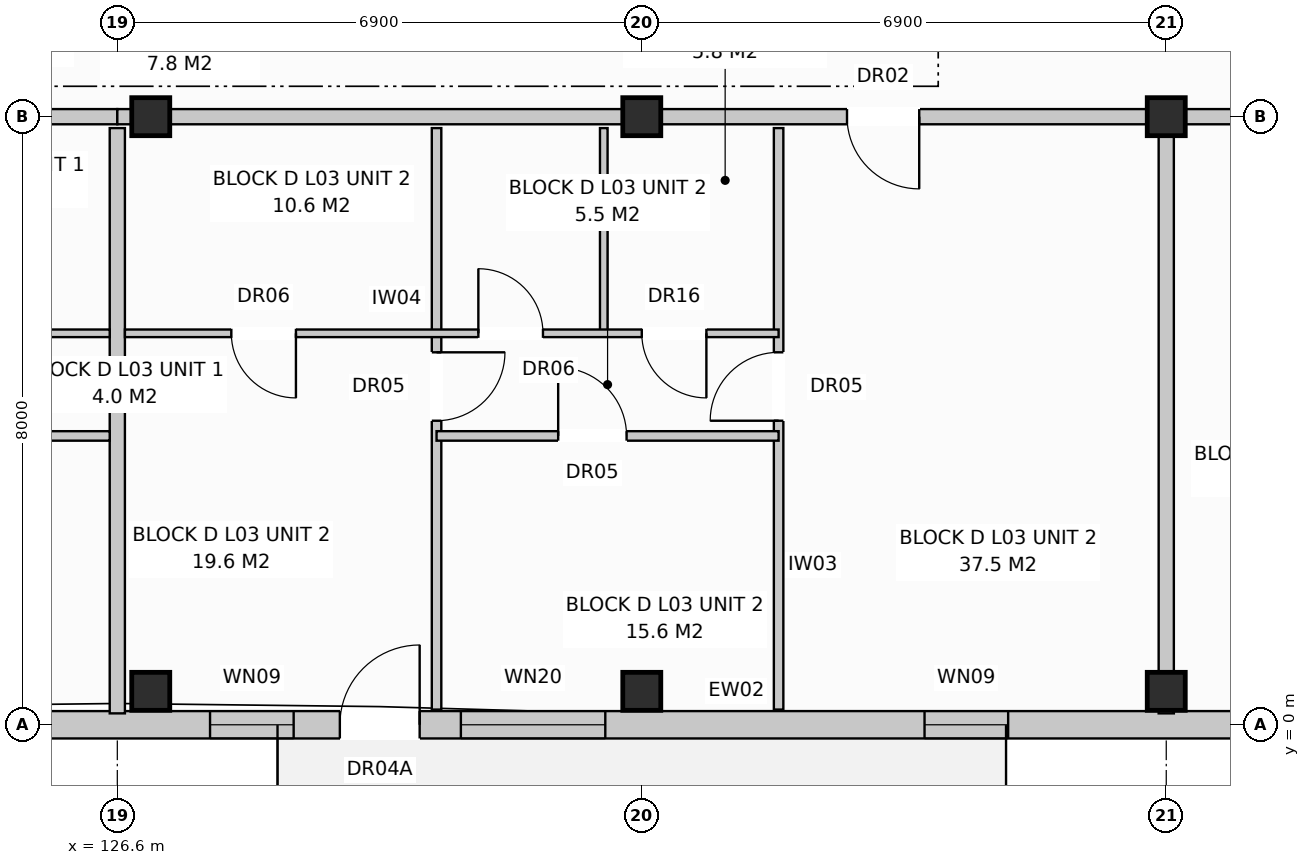
"""IFC4 building model, lengths in metres.
Left out: names, types, materials, properties, quantities, classifications, styles, units other than length and angle.
Written with IfcOpenShell. Run it as: python <this file> out.ifc"""

import sys

from ifc_helpers import new_model, si_unit, direction, frame, frame_2d, origin, origin_with_axes, origin_2d, place, context, subcontext, project, spatial, rectangle, extrude, element, fill, save


model = new_model("IFC4")
c1 = context("Model", 3, precision=1e-05, world=origin(), true_north=direction((0.0, 1.0)))
c2 = subcontext(c1, "Body", "Model", "MODEL_VIEW")
j1 = project(units=[si_unit("LENGTHUNIT", "METRE"), si_unit("PLANEANGLEUNIT", "RADIAN")], contexts=[c1])
p1 = place(None, origin())
s1 = spatial("IfcSite", under=j1, at=p1, CompositionType="ELEMENT")
p2 = place(p1, origin())
s2 = spatial("IfcBuilding", under=s1, at=p2, CompositionType="ELEMENT")
p3 = place(p2, frame((0.0, 0.0, 11.2)))
s3 = spatial("IfcBuildingStorey", under=s2, at=p3, CompositionType="ELEMENT", Elevation=11.2)
for number, where, z_axis, x_axis in (
    (1, (127.04, 0.44, 0.0), (0.0, 0.0, 1.0), (1.0, 0.0, 0.0)),
    (2, (127.04, 8.0, 0.0), (0.0, 0.0, 1.0), (1.0, 0.0, 0.0)),
    (3, (133.5, 0.44, 0.0), (0.0, 0.0, 1.0), (1.0, 0.0, 0.0)),
    (4, (133.5, 8.0, 0.0), (0.0, 0.0, 1.0), (1.0, 0.0, 0.0)),
    (5, (140.4, 0.44, 0.0), (0.0, 0.0, 1.0), (1.0, 0.0, 0.0)),
    (6, (140.4, 8.0, 0.0), (0.0, 0.0, 1.0), (1.0, 0.0, 0.0)),
):
    element("IfcColumn", number, at=place(p3, frame(where, z_axis=z_axis, x_axis=x_axis)), inside=s3, PredefinedType="COLUMN", context=c2, shape_type="SweptSolid", body=[
        extrude(rectangle(XDim=0.5, YDim=0.5, at=origin_2d()), origin(), (0.0, 0.0, 1.0), 3.2),
    ])
p4 = place(p3, frame((112.97, 0.0, 0.0), z_axis=(0.0, 0.0, 1.0), x_axis=(1.0, 0.0, 0.0)))
e7 = element("IfcWall", 7, at=p4, inside=s3, PredefinedType="STANDARD", context=c2, shape_type="SweptSolid", body=[
    extrude(rectangle(XDim=54.86, YDim=0.36, at=frame_2d((27.43, 0.0))), origin(), (0.0, 0.0, 1.0), 2.94),
])
p5 = place(p4, frame((3.764, 0.0, 0.0)))
e8 = element("IfcOpeningElement", 8, at=p5, cuts=e7, PredefinedType="OPENING", context=c2, shape_type="SweptSolid", body=[
    extrude(rectangle(XDim=1.05, YDim=2.12, at=frame_2d((0.525, 1.06))), frame((0.0, 0.192, 0.0), z_axis=(0.0, -1.0, 0.0), x_axis=(1.0, 0.0, 0.0)), (0.0, 0.0, 1.0), 0.384),
])
p6 = place(p4, frame((16.558, 0.0, 0.0)))
e9 = element("IfcOpeningElement", 9, at=p6, cuts=e7, PredefinedType="OPENING", context=c2, shape_type="SweptSolid", body=[
    extrude(rectangle(XDim=1.05, YDim=2.12, at=frame_2d((0.525, 1.06))), frame((0.0, 0.192, 0.0), z_axis=(0.0, -1.0, 0.0), x_axis=(1.0, 0.0, 0.0)), (0.0, 0.0, 1.0), 0.384),
])
p7 = place(p4, frame((30.058, 0.0, 0.0)))
e10 = element("IfcOpeningElement", 10, at=p7, cuts=e7, PredefinedType="OPENING", context=c2, shape_type="SweptSolid", body=[
    extrude(rectangle(XDim=1.05, YDim=2.12, at=frame_2d((0.525, 1.06))), frame((0.0, 0.192, 0.0), z_axis=(0.0, -1.0, 0.0), x_axis=(1.0, 0.0, 0.0)), (0.0, 0.0, 1.0), 0.384),
])
p8 = place(p4, frame((45.158, 0.0, 0.0)))
e11 = element("IfcOpeningElement", 11, at=p8, cuts=e7, PredefinedType="OPENING", context=c2, shape_type="SweptSolid", body=[
    extrude(rectangle(XDim=1.05, YDim=2.12, at=frame_2d((0.525, 1.06))), frame((0.0, 0.192, 0.0), z_axis=(0.0, -1.0, 0.0), x_axis=(1.0, 0.0, 0.0)), (0.0, 0.0, 1.0), 0.384),
])
p9 = place(p4, frame((1.6, 0.0, 0.8)))
e12 = element("IfcOpeningElement", 12, at=p9, cuts=e7, PredefinedType="OPENING", context=c2, shape_type="SweptSolid", body=[
    extrude(rectangle(XDim=1.8, YDim=1.7, at=frame_2d((0.9, 0.85))), frame((0.0, 0.192, 0.0), z_axis=(0.0, -1.0, 0.0), x_axis=(1.0, 0.0, 0.0)), (0.0, 0.0, 1.0), 0.384),
])
p10 = place(p4, frame((7.65, 0.0, 0.72)))
e13 = element("IfcOpeningElement", 13, at=p10, cuts=e7, PredefinedType="OPENING", context=c2, shape_type="SweptSolid", body=[
    extrude(rectangle(XDim=1.1, YDim=1.5, at=frame_2d((0.55, 0.75))), frame((0.0, 0.192, 0.0), z_axis=(0.0, -1.0, 0.0), x_axis=(1.0, 0.0, 0.0)), (0.0, 0.0, 1.0), 0.384),
])
p11 = place(p4, frame((10.425, 0.0, 0.8)))
e14 = element("IfcOpeningElement", 14, at=p11, cuts=e7, PredefinedType="OPENING", context=c2, shape_type="SweptSolid", body=[
    extrude(rectangle(XDim=1.95, YDim=1.65, at=frame_2d((0.975, 0.825))), frame((0.0, 0.192, 0.0), z_axis=(0.0, -1.0, 0.0), x_axis=(1.0, 0.0, 0.0)), (0.0, 0.0, 1.0), 0.384),
])
p12 = place(p4, frame((14.85, 0.0, 0.72)))
e15 = element("IfcOpeningElement", 15, at=p12, cuts=e7, PredefinedType="OPENING", context=c2, shape_type="SweptSolid", body=[
    extrude(rectangle(XDim=1.1, YDim=1.5, at=frame_2d((0.55, 0.75))), frame((0.0, 0.192, 0.0), z_axis=(0.0, -1.0, 0.0), x_axis=(1.0, 0.0, 0.0)), (0.0, 0.0, 1.0), 0.384),
])
p13 = place(p4, frame((18.15, 0.0, 0.72)))
e16 = element("IfcOpeningElement", 16, at=p13, cuts=e7, PredefinedType="OPENING", context=c2, shape_type="SweptSolid", body=[
    extrude(rectangle(XDim=1.9, YDim=1.85, at=frame_2d((0.95, 0.925))), frame((0.0, 0.192, 0.0), z_axis=(0.0, -1.0, 0.0), x_axis=(1.0, 0.0, 0.0)), (0.0, 0.0, 1.0), 0.384),
])
p14 = place(p4, frame((24.25, 0.0, 0.72)))
e17 = element("IfcOpeningElement", 17, at=p14, cuts=e7, PredefinedType="OPENING", context=c2, shape_type="SweptSolid", body=[
    extrude(rectangle(XDim=1.1, YDim=1.5, at=frame_2d((0.55, 0.75))), frame((0.0, 0.192, 0.0), z_axis=(0.0, -1.0, 0.0), x_axis=(1.0, 0.0, 0.0)), (0.0, 0.0, 1.0), 0.384),
])
p15 = place(p4, frame((28.35, 0.0, 0.72)))
e18 = element("IfcOpeningElement", 18, at=p15, cuts=e7, PredefinedType="OPENING", context=c2, shape_type="SweptSolid", body=[
    extrude(rectangle(XDim=1.1, YDim=1.5, at=frame_2d((0.55, 0.75))), frame((0.0, 0.192, 0.0), z_axis=(0.0, -1.0, 0.0), x_axis=(1.0, 0.0, 0.0)), (0.0, 0.0, 1.0), 0.384),
])
p16 = place(p4, frame((31.85, 0.0, 0.72)))
e19 = element("IfcOpeningElement", 19, at=p16, cuts=e7, PredefinedType="OPENING", context=c2, shape_type="SweptSolid", body=[
    extrude(rectangle(XDim=1.9, YDim=1.85, at=frame_2d((0.95, 0.925))), frame((0.0, 0.192, 0.0), z_axis=(0.0, -1.0, 0.0), x_axis=(1.0, 0.0, 0.0)), (0.0, 0.0, 1.0), 0.384),
])
p17 = place(p4, frame((35.325, 0.0, 0.8)))
e20 = element("IfcOpeningElement", 20, at=p17, cuts=e7, PredefinedType="OPENING", context=c2, shape_type="SweptSolid", body=[
    extrude(rectangle(XDim=1.95, YDim=1.65, at=frame_2d((0.975, 0.825))), frame((0.0, 0.192, 0.0), z_axis=(0.0, -1.0, 0.0), x_axis=(1.0, 0.0, 0.0)), (0.0, 0.0, 1.0), 0.384),
])
p18 = place(p4, frame((39.15, 0.0, 0.72)))
e21 = element("IfcOpeningElement", 21, at=p18, cuts=e7, PredefinedType="OPENING", context=c2, shape_type="SweptSolid", body=[
    extrude(rectangle(XDim=1.1, YDim=1.5, at=frame_2d((0.55, 0.75))), frame((0.0, 0.192, 0.0), z_axis=(0.0, -1.0, 0.0), x_axis=(1.0, 0.0, 0.0)), (0.0, 0.0, 1.0), 0.384),
])
p19 = place(p4, frame((42.95, 0.0, 0.8)))
e22 = element("IfcOpeningElement", 22, at=p19, cuts=e7, PredefinedType="OPENING", context=c2, shape_type="SweptSolid", body=[
    extrude(rectangle(XDim=1.9, YDim=1.85, at=frame_2d((0.95, 0.925))), frame((0.0, 0.192, 0.0), z_axis=(0.0, -1.0, 0.0), x_axis=(1.0, 0.0, 0.0)), (0.0, 0.0, 1.0), 0.384),
])
p20 = place(p4, frame((48.583, 0.0, 0.8)))
e23 = element("IfcOpeningElement", 23, at=p20, cuts=e7, PredefinedType="OPENING", context=c2, shape_type="SweptSolid", body=[
    extrude(rectangle(XDim=1.95, YDim=1.65, at=frame_2d((0.975, 0.825))), frame((0.0, 0.192, 0.0), z_axis=(0.0, -1.0, 0.0), x_axis=(1.0, 0.0, 0.0)), (0.0, 0.0, 1.0), 0.384),
])
p21 = place(p4, frame((52.25, 0.0, 0.72)))
e24 = element("IfcOpeningElement", 24, at=p21, cuts=e7, PredefinedType="OPENING", context=c2, shape_type="SweptSolid", body=[
    extrude(rectangle(XDim=1.1, YDim=1.5, at=frame_2d((0.55, 0.75))), frame((0.0, 0.192, 0.0), z_axis=(0.0, -1.0, 0.0), x_axis=(1.0, 0.0, 0.0)), (0.0, 0.0, 1.0), 0.384),
])
p22 = place(p3, frame((126.6, 7.85, 0.0), z_axis=(0.0, 0.0, 1.0), x_axis=(0.0, -1.0, 0.0)))
e25 = element("IfcWall", 25, at=p22, inside=s3, PredefinedType="PARTITIONING", context=c2, shape_type="SweptSolid", body=[
    extrude(rectangle(XDim=7.7, YDim=0.2, at=frame_2d((3.85, 0.0))), origin(), (0.0, 0.0, 1.0), 2.94),
])
p23 = place(p3, frame((112.8, 8.0, 0.0), z_axis=(0.0, 0.0, 1.0), x_axis=(1.0, 0.0, 0.0)))
e26 = element("IfcWall", 26, at=p23, inside=s3, PredefinedType="PARTITIONING", context=c2, shape_type="SweptSolid", body=[
    extrude(rectangle(XDim=13.8, YDim=0.2, at=frame_2d((6.9, 0.0))), origin(), (0.0, 0.0, 1.0), 2.38),
])
p24 = place(p23, frame((2.4, 0.0, 0.0)))
e27 = element("IfcOpeningElement", 27, at=p24, cuts=e26, PredefinedType="OPENING", context=c2, shape_type="SweptSolid", body=[
    extrude(rectangle(XDim=0.95, YDim=2.15, at=frame_2d((0.475, 1.075))), frame((0.0, 0.112, 0.0), z_axis=(0.0, -1.0, 0.0), x_axis=(1.0, 0.0, 0.0)), (0.0, 0.0, 1.0), 0.224),
])
p25 = place(p3, frame((118.0, 5.15, 0.0), z_axis=(0.0, 0.0, 1.0), x_axis=(1.0, 0.0, 0.0)))
e28 = element("IfcWall", 28, at=p25, inside=s3, PredefinedType="PARTITIONING", context=c2, shape_type="SweptSolid", body=[
    extrude(rectangle(XDim=8.5, YDim=0.1, at=frame_2d((4.25, 0.0))), origin(), (0.0, 0.0, 1.0), 2.94),
])
p26 = place(p25, frame((1.0, 0.0, 0.0)))
e29 = element("IfcOpeningElement", 29, at=p26, cuts=e28, PredefinedType="OPENING", context=c2, shape_type="SweptSolid", body=[
    extrude(rectangle(XDim=0.85, YDim=2.1, at=frame_2d((0.425, 1.05))), frame((0.0, 0.062, 0.0), z_axis=(0.0, -1.0, 0.0), x_axis=(1.0, 0.0, 0.0)), (0.0, 0.0, 1.0), 0.124),
])
p27 = place(p25, frame((3.4, 0.0, 0.0)))
e30 = element("IfcOpeningElement", 30, at=p27, cuts=e28, PredefinedType="OPENING", context=c2, shape_type="SweptSolid", body=[
    extrude(rectangle(XDim=0.85, YDim=2.05, at=frame_2d((0.425, 1.025))), frame((0.0, 0.062, 0.0), z_axis=(0.0, -1.0, 0.0), x_axis=(1.0, 0.0, 0.0)), (0.0, 0.0, 1.0), 0.124),
])
p28 = place(p25, frame((6.2, 0.0, 0.0)))
e31 = element("IfcOpeningElement", 31, at=p28, cuts=e28, PredefinedType="OPENING", context=c2, shape_type="SweptSolid", body=[
    extrude(rectangle(XDim=0.85, YDim=2.05, at=frame_2d((0.425, 1.025))), frame((0.0, 0.062, 0.0), z_axis=(0.0, -1.0, 0.0), x_axis=(1.0, 0.0, 0.0)), (0.0, 0.0, 1.0), 0.124),
])
p29 = place(p3, frame((118.0, 3.8, 0.0), z_axis=(0.0, 0.0, 1.0), x_axis=(1.0, 0.0, 0.0)))
e32 = element("IfcWall", 32, at=p29, inside=s3, PredefinedType="PARTITIONING", context=c2, shape_type="SweptSolid", body=[
    extrude(rectangle(XDim=8.5, YDim=0.125, at=frame_2d((4.25, 0.0))), origin(), (0.0, 0.0, 1.0), 2.94),
])
p30 = place(p29, frame((1.5, 0.0, 0.0)))
e33 = element("IfcOpeningElement", 33, at=p30, cuts=e32, PredefinedType="OPENING", context=c2, shape_type="SweptSolid", body=[
    extrude(rectangle(XDim=0.9, YDim=2.1, at=frame_2d((0.45, 1.05))), frame((0.0, 0.074, 0.0), z_axis=(0.0, -1.0, 0.0), x_axis=(1.0, 0.0, 0.0)), (0.0, 0.0, 1.0), 0.149),
])
p31 = place(p29, frame((5.6, 0.0, 0.0)))
e34 = element("IfcOpeningElement", 34, at=p31, cuts=e32, PredefinedType="OPENING", context=c2, shape_type="SweptSolid", body=[
    extrude(rectangle(XDim=0.9, YDim=2.1, at=frame_2d((0.45, 1.05))), frame((0.0, 0.074, 0.0), z_axis=(0.0, -1.0, 0.0), x_axis=(1.0, 0.0, 0.0)), (0.0, 0.0, 1.0), 0.149),
])
p32 = place(p3, frame((140.4, 7.85, 0.0), z_axis=(0.0, 0.0, 1.0), x_axis=(0.0, -1.0, 0.0)))
e35 = element("IfcWall", 35, at=p32, inside=s3, PredefinedType="PARTITIONING", context=c2, shape_type="SweptSolid", body=[
    extrude(rectangle(XDim=7.7, YDim=0.2, at=frame_2d((3.85, 0.0))), origin(), (0.0, 0.0, 1.0), 2.94),
])
p33 = place(p3, frame((126.6, 8.0, 0.0), z_axis=(0.0, 0.0, 1.0), x_axis=(1.0, 0.0, 0.0)))
e36 = element("IfcWall", 36, at=p33, inside=s3, PredefinedType="PARTITIONING", context=c2, shape_type="SweptSolid", body=[
    extrude(rectangle(XDim=13.8, YDim=0.2, at=frame_2d((6.9, 0.0))), origin(), (0.0, 0.0, 1.0), 2.38),
])
p34 = place(p33, frame((9.6, 0.0, 0.0)))
e37 = element("IfcOpeningElement", 37, at=p34, cuts=e36, PredefinedType="OPENING", context=c2, shape_type="SweptSolid", body=[
    extrude(rectangle(XDim=0.95, YDim=2.15, at=frame_2d((0.475, 1.075))), frame((0.0, 0.112, 0.0), z_axis=(0.0, -1.0, 0.0), x_axis=(1.0, 0.0, 0.0)), (0.0, 0.0, 1.0), 0.224),
])
p35 = place(p3, frame((135.3, 7.85, 0.0), z_axis=(0.0, 0.0, 1.0), x_axis=(0.0, -1.0, 0.0)))
e38 = element("IfcWall", 38, at=p35, inside=s3, PredefinedType="PARTITIONING", context=c2, shape_type="SweptSolid", body=[
    extrude(rectangle(XDim=7.65, YDim=0.125, at=frame_2d((3.825, 0.0))), origin(), (0.0, 0.0, 1.0), 2.94),
])
p36 = place(p35, frame((2.95, 0.0, 0.0)))
e39 = element("IfcOpeningElement", 39, at=p36, cuts=e38, PredefinedType="OPENING", context=c2, shape_type="SweptSolid", body=[
    extrude(rectangle(XDim=0.9, YDim=2.1, at=frame_2d((0.45, 1.05))), frame((0.0, 0.074, 0.0), z_axis=(0.0, -1.0, 0.0), x_axis=(1.0, 0.0, 0.0)), (0.0, 0.0, 1.0), 0.149),
])
p37 = place(p3, frame((130.8, 7.85, 0.0), z_axis=(0.0, 0.0, 1.0), x_axis=(0.0, -1.0, 0.0)))
e40 = element("IfcWall", 40, at=p37, inside=s3, PredefinedType="PARTITIONING", context=c2, shape_type="SweptSolid", body=[
    extrude(rectangle(XDim=7.65, YDim=0.125, at=frame_2d((3.825, 0.0))), origin(), (0.0, 0.0, 1.0), 2.94),
])
p38 = place(p37, frame((2.95, 0.0, 0.0)))
e41 = element("IfcOpeningElement", 41, at=p38, cuts=e40, PredefinedType="OPENING", context=c2, shape_type="SweptSolid", body=[
    extrude(rectangle(XDim=0.9, YDim=2.1, at=frame_2d((0.45, 1.05))), frame((0.0, 0.074, 0.0), z_axis=(0.0, -1.0, 0.0), x_axis=(1.0, 0.0, 0.0)), (0.0, 0.0, 1.0), 0.149),
])
p39 = place(p3, frame((133.0, 7.85, 0.0), z_axis=(0.0, 0.0, 1.0), x_axis=(0.0, -1.0, 0.0)))
e42 = element("IfcWall", 42, at=p39, inside=s3, PredefinedType="PARTITIONING", context=c2, shape_type="SweptSolid", body=[
    extrude(rectangle(XDim=2.7, YDim=0.1, at=frame_2d((1.35, 0.0))), origin(), (0.0, 0.0, 1.0), 2.94),
])
p40 = place(p3, frame((126.7, 5.15, 0.0), z_axis=(0.0, 0.0, 1.0), x_axis=(1.0, 0.0, 0.0)))
e43 = element("IfcWall", 43, at=p40, inside=s3, PredefinedType="PARTITIONING", context=c2, shape_type="SweptSolid", body=[
    extrude(rectangle(XDim=8.6, YDim=0.1, at=frame_2d((4.3, 0.0))), origin(), (0.0, 0.0, 1.0), 2.94),
])
p41 = place(p40, frame((1.4, 0.0, 0.0)))
e44 = element("IfcOpeningElement", 44, at=p41, cuts=e43, PredefinedType="OPENING", context=c2, shape_type="SweptSolid", body=[
    extrude(rectangle(XDim=0.85, YDim=2.05, at=frame_2d((0.425, 1.025))), frame((0.0, 0.062, 0.0), z_axis=(0.0, -1.0, 0.0), x_axis=(1.0, 0.0, 0.0)), (0.0, 0.0, 1.0), 0.124),
])
p42 = place(p40, frame((4.65, 0.0, 0.0)))
e45 = element("IfcOpeningElement", 45, at=p42, cuts=e43, PredefinedType="OPENING", context=c2, shape_type="SweptSolid", body=[
    extrude(rectangle(XDim=0.85, YDim=2.05, at=frame_2d((0.425, 1.025))), frame((0.0, 0.062, 0.0), z_axis=(0.0, -1.0, 0.0), x_axis=(1.0, 0.0, 0.0)), (0.0, 0.0, 1.0), 0.124),
])
p43 = place(p40, frame((6.8, 0.0, 0.0)))
e46 = element("IfcOpeningElement", 46, at=p43, cuts=e43, PredefinedType="OPENING", context=c2, shape_type="SweptSolid", body=[
    extrude(rectangle(XDim=0.85, YDim=2.1, at=frame_2d((0.425, 1.05))), frame((0.0, 0.062, 0.0), z_axis=(0.0, -1.0, 0.0), x_axis=(1.0, 0.0, 0.0)), (0.0, 0.0, 1.0), 0.124),
])
p44 = place(p3, frame((130.8, 3.8, 0.0), z_axis=(0.0, 0.0, 1.0), x_axis=(1.0, 0.0, 0.0)))
e47 = element("IfcWall", 47, at=p44, inside=s3, PredefinedType="PARTITIONING", context=c2, shape_type="SweptSolid", body=[
    extrude(rectangle(XDim=4.5, YDim=0.125, at=frame_2d((2.25, 0.0))), origin(), (0.0, 0.0, 1.0), 2.94),
])
p45 = place(p44, frame((1.6, 0.0, 0.0)))
e48 = element("IfcOpeningElement", 48, at=p45, cuts=e47, PredefinedType="OPENING", context=c2, shape_type="SweptSolid", body=[
    extrude(rectangle(XDim=0.9, YDim=2.1, at=frame_2d((0.45, 1.05))), frame((0.0, 0.074, 0.0), z_axis=(0.0, -1.0, 0.0), x_axis=(1.0, 0.0, 0.0)), (0.0, 0.0, 1.0), 0.149),
])
p46 = place(p3, frame((140.4, 8.0, 0.0), z_axis=(0.0, 0.0, 1.0), x_axis=(1.0, 0.0, 0.0)))
e49 = element("IfcWall", 49, at=p46, inside=s3, PredefinedType="PARTITIONING", context=c2, shape_type="SweptSolid", body=[
    extrude(rectangle(XDim=6.9, YDim=0.2, at=frame_2d((3.45, 0.0))), origin(), (0.0, 0.0, 1.0), 2.38),
])
p47 = place(p46, frame((2.0, 0.0, 0.0)))
e50 = element("IfcOpeningElement", 50, at=p47, cuts=e49, PredefinedType="OPENING", context=c2, shape_type="SweptSolid", body=[
    extrude(rectangle(XDim=0.95, YDim=2.15, at=frame_2d((0.475, 1.075))), frame((0.0, 0.112, 0.0), z_axis=(0.0, -1.0, 0.0), x_axis=(1.0, 0.0, 0.0)), (0.0, 0.0, 1.0), 0.224),
])
p48 = place(p6, origin_with_axes())
e51 = element("IfcDoor", 51, at=p48, inside=s3, OperationType="SINGLE_SWING_RIGHT", PredefinedType="DOOR", context=c2, shape_type="SweptSolid", body=[
    extrude(rectangle(XDim=1.05, YDim=2.12, at=frame_2d((0.525, 1.06))), frame((0.0, 0.025, 0.0), z_axis=(0.0, -1.0, 0.0), x_axis=(1.0, 0.0, 0.0)), (0.0, 0.0, 1.0), 0.05),
])
fill(e9, e51)
p49 = place(p12, origin_with_axes())
e52 = element("IfcWindow", 52, at=p49, inside=s3, PartitioningType="SINGLE_PANEL", PredefinedType="WINDOW", context=c2, shape_type="SweptSolid", body=[
    extrude(rectangle(XDim=1.1, YDim=1.5, at=frame_2d((0.55, 0.75))), frame((0.0, 0.03, 0.0), z_axis=(0.0, -1.0, 0.0), x_axis=(1.0, 0.0, 0.0)), (0.0, 0.0, 1.0), 0.06),
])
fill(e15, e52)
p50 = place(p13, origin_with_axes())
e53 = element("IfcWindow", 53, at=p50, inside=s3, PartitioningType="SINGLE_PANEL", PredefinedType="WINDOW", context=c2, shape_type="SweptSolid", body=[
    extrude(rectangle(XDim=1.9, YDim=1.85, at=frame_2d((0.95, 0.925))), frame((0.0, 0.03, 0.0), z_axis=(0.0, -1.0, 0.0), x_axis=(1.0, 0.0, 0.0)), (0.0, 0.0, 1.0), 0.06),
])
fill(e16, e53)
p51 = place(p14, origin_with_axes())
e54 = element("IfcWindow", 54, at=p51, inside=s3, PartitioningType="SINGLE_PANEL", PredefinedType="WINDOW", context=c2, shape_type="SweptSolid", body=[
    extrude(rectangle(XDim=1.1, YDim=1.5, at=frame_2d((0.55, 0.75))), frame((0.0, 0.03, 0.0), z_axis=(0.0, -1.0, 0.0), x_axis=(1.0, 0.0, 0.0)), (0.0, 0.0, 1.0), 0.06),
])
fill(e17, e54)
p52 = place(p34, frame((0.95, 0.0, 0.0), z_axis=(0.0, 0.0, 1.0), x_axis=(-1.0, 0.0, 0.0)))
e55 = element("IfcDoor", 55, at=p52, inside=s3, OperationType="SINGLE_SWING_RIGHT", PredefinedType="DOOR", context=c2, shape_type="SweptSolid", body=[
    extrude(rectangle(XDim=0.95, YDim=2.15, at=frame_2d((0.475, 1.075))), frame((0.0, 0.025, 0.0), z_axis=(0.0, -1.0, 0.0), x_axis=(1.0, 0.0, 0.0)), (0.0, 0.0, 1.0), 0.05),
])
fill(e37, e55)
p53 = place(p36, frame((0.9, 0.0, 0.0), z_axis=(0.0, 0.0, 1.0), x_axis=(-1.0, 0.0, 0.0)))
e56 = element("IfcDoor", 56, at=p53, inside=s3, OperationType="SINGLE_SWING_RIGHT", PredefinedType="DOOR", context=c2, shape_type="SweptSolid", body=[
    extrude(rectangle(XDim=0.9, YDim=2.1, at=frame_2d((0.45, 1.05))), frame((0.0, 0.025, 0.0), z_axis=(0.0, -1.0, 0.0), x_axis=(1.0, 0.0, 0.0)), (0.0, 0.0, 1.0), 0.05),
])
fill(e39, e56)
p54 = place(p38, origin_with_axes())
e57 = element("IfcDoor", 57, at=p54, inside=s3, OperationType="SINGLE_SWING_LEFT", PredefinedType="DOOR", context=c2, shape_type="SweptSolid", body=[
    extrude(rectangle(XDim=0.9, YDim=2.1, at=frame_2d((0.45, 1.05))), frame((0.0, 0.025, 0.0), z_axis=(0.0, -1.0, 0.0), x_axis=(1.0, 0.0, 0.0)), (0.0, 0.0, 1.0), 0.05),
])
fill(e41, e57)
p55 = place(p41, frame((0.85, 0.0, 0.0), z_axis=(0.0, 0.0, 1.0), x_axis=(-1.0, 0.0, 0.0)))
e58 = element("IfcDoor", 58, at=p55, inside=s3, OperationType="SINGLE_SWING_RIGHT", PredefinedType="DOOR", context=c2, shape_type="SweptSolid", body=[
    extrude(rectangle(XDim=0.85, YDim=2.05, at=frame_2d((0.425, 1.025))), frame((0.0, 0.025, 0.0), z_axis=(0.0, -1.0, 0.0), x_axis=(1.0, 0.0, 0.0)), (0.0, 0.0, 1.0), 0.05),
])
fill(e44, e58)
p56 = place(p42, origin_with_axes())
e59 = element("IfcDoor", 59, at=p56, inside=s3, OperationType="SINGLE_SWING_LEFT", PredefinedType="DOOR", context=c2, shape_type="SweptSolid", body=[
    extrude(rectangle(XDim=0.85, YDim=2.05, at=frame_2d((0.425, 1.025))), frame((0.0, 0.025, 0.0), z_axis=(0.0, -1.0, 0.0), x_axis=(1.0, 0.0, 0.0)), (0.0, 0.0, 1.0), 0.05),
])
fill(e45, e59)
p57 = place(p43, frame((0.85, 0.0, 0.0), z_axis=(0.0, 0.0, 1.0), x_axis=(-1.0, 0.0, 0.0)))
e60 = element("IfcDoor", 60, at=p57, inside=s3, OperationType="SINGLE_SWING_RIGHT", PredefinedType="DOOR", context=c2, shape_type="SweptSolid", body=[
    extrude(rectangle(XDim=0.85, YDim=2.1, at=frame_2d((0.425, 1.05))), frame((0.0, 0.025, 0.0), z_axis=(0.0, -1.0, 0.0), x_axis=(1.0, 0.0, 0.0)), (0.0, 0.0, 1.0), 0.05),
])
fill(e46, e60)
p58 = place(p45, origin_with_axes())
e61 = element("IfcDoor", 61, at=p58, inside=s3, OperationType="SINGLE_SWING_LEFT", PredefinedType="DOOR", context=c2, shape_type="SweptSolid", body=[
    extrude(rectangle(XDim=0.9, YDim=2.1, at=frame_2d((0.45, 1.05))), frame((0.0, 0.025, 0.0), z_axis=(0.0, -1.0, 0.0), x_axis=(1.0, 0.0, 0.0)), (0.0, 0.0, 1.0), 0.05),
])
fill(e48, e61)
save(model, sys.argv[1])
